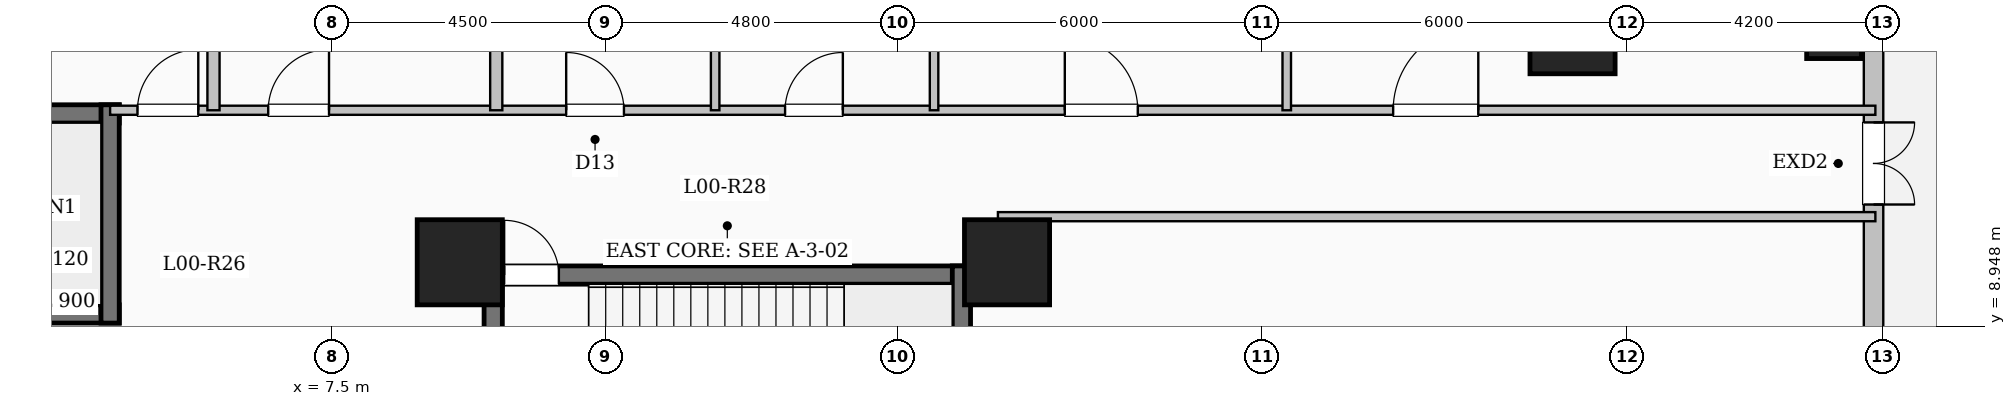
"""IFC4 building model, lengths in metres.
Left out: names, types, materials, properties, quantities, classifications, styles, units other than length and angle.
Written with IfcOpenShell. Run it as: python <this file> out.ifc"""

import sys

from ifc_helpers import new_model, si_unit, direction, frame, frame_2d, origin, origin_2d, place, context, subcontext, project, spatial, rectangle, extrude, element, fill, save


model = new_model("IFC4")
c1 = context("Model", 3, precision=1e-05, world=origin(), true_north=direction((0.0, 1.0)))
c2 = subcontext(c1, "Body", "Model", "MODEL_VIEW")
j1 = project(units=[si_unit("LENGTHUNIT", "METRE"), si_unit("PLANEANGLEUNIT", "RADIAN")], contexts=[c1])
p1 = place(None, origin())
s1 = spatial("IfcSite", under=j1, at=p1, CompositionType="ELEMENT")
p2 = place(p1, origin())
s2 = spatial("IfcBuilding", under=s1, at=p2, CompositionType="ELEMENT")
p3 = place(p2, origin())
s3 = spatial("IfcBuildingStorey", under=s2, at=p3, CompositionType="ELEMENT", Elevation=0.0)
for number, where, z_axis, x_axis in (
    (1, (9.6, 10.0, 0.0), (0.0, 0.0, 1.0), (1.0, 0.0, 0.0)),
    (2, (18.6, 10.0, 0.0), (0.0, 0.0, 1.0), (1.0, 0.0, 0.0)),
):
    element("IfcColumn", number, at=place(p3, frame(where, z_axis=z_axis, x_axis=x_axis)), inside=s3, PredefinedType="COLUMN", context=c2, shape_type="SweptSolid", body=[
        extrude(rectangle(XDim=1.4, YDim=1.4, at=origin_2d()), origin(), (0.0, 0.0, 1.0), 5.4),
    ])
p4 = place(p3, frame((32.2, 13.8, 0.0), z_axis=(0.0, 0.0, 1.0), x_axis=(1.0, 0.0, 0.0)))
e3 = element("IfcColumn", 3, at=p4, inside=s3, PredefinedType="COLUMN", context=c2, shape_type="SweptSolid", body=[
    extrude(rectangle(XDim=0.9, YDim=0.9, at=origin_2d()), origin(), (0.0, 0.0, 1.0), 5.4),
])
p5 = place(p3, frame((27.9, 13.8, 0.0), z_axis=(0.0, 0.0, 1.0), x_axis=(1.0, 0.0, 0.0)))
e4 = element("IfcColumn", 4, at=p5, inside=s3, PredefinedType="COLUMN", context=c2, shape_type="SweptSolid", body=[
    extrude(rectangle(XDim=1.4, YDim=1.4, at=origin_2d()), origin(), (0.0, 0.0, 1.0), 5.4),
])
p6 = place(p3, frame((32.85, 29.85, 0.0), z_axis=(0.0, 0.0, 1.0), x_axis=(0.0, -1.0, 0.0)))
e5 = element("IfcWall", 5, at=p6, inside=s3, PredefinedType="SOLIDWALL", context=c2, shape_type="SweptSolid", body=[
    extrude(rectangle(XDim=59.7, YDim=0.32, at=frame_2d((29.85, 0.0))), origin(), (0.0, 0.0, 1.0), 5.1),
])
p7 = place(p6, frame((17.55, 0.0, 0.0)))
e6 = element("IfcOpeningElement", 6, at=p7, cuts=e5, PredefinedType="OPENING", context=c2, shape_type="SweptSolid", body=[
    extrude(rectangle(XDim=1.35, YDim=2.2, at=frame_2d((0.675, 1.1))), frame((0.0, 0.17, 0.0), z_axis=(0.0, -1.0, 0.0), x_axis=(1.0, 0.0, 0.0)), (0.0, 0.0, 1.0), 0.34),
])
p8 = place(p6, frame((46.65, 0.0, 0.0)))
e7 = element("IfcOpeningElement", 7, at=p8, cuts=e5, PredefinedType="OPENING", context=c2, shape_type="SweptSolid", body=[
    extrude(rectangle(XDim=2.0, YDim=2.4, at=frame_2d((1.0, 1.2))), frame((0.0, 0.17, 0.0), z_axis=(0.0, -1.0, 0.0), x_axis=(1.0, 0.0, 0.0)), (0.0, 0.0, 1.0), 0.34),
])
p9 = place(p6, frame((24.35, 0.0, 0.0)))
e8 = element("IfcOpeningElement", 8, at=p9, cuts=e5, PredefinedType="OPENING", context=c2, shape_type="SweptSolid", body=[
    extrude(rectangle(XDim=3.0, YDim=2.8, at=frame_2d((1.5, 1.4))), frame((0.0, 0.17, 0.0), z_axis=(0.0, -1.0, 0.0), x_axis=(1.0, 0.0, 0.0)), (0.0, 0.0, 1.0), 0.34),
])
p10 = place(p6, frame((7.6, 0.0, 0.9)))
e9 = element("IfcOpeningElement", 9, at=p10, cuts=e5, PredefinedType="OPENING", context=c2, shape_type="SweptSolid", body=[
    extrude(rectangle(XDim=2.1, YDim=2.0, at=frame_2d((1.05, 1.0))), frame((0.0, 0.17, 0.0), z_axis=(0.0, -1.0, 0.0), x_axis=(1.0, 0.0, 0.0)), (0.0, 0.0, 1.0), 0.34),
])
p11 = place(p6, frame((37.758, 0.0, 0.9)))
e10 = element("IfcOpeningElement", 10, at=p11, cuts=e5, PredefinedType="OPENING", context=c2, shape_type="SweptSolid", body=[
    extrude(rectangle(XDim=1.7, YDim=1.9, at=frame_2d((0.85, 0.95))), frame((0.0, 0.17, 0.0), z_axis=(0.0, -1.0, 0.0), x_axis=(1.0, 0.0, 0.0)), (0.0, 0.0, 1.0), 0.34),
])
p12 = place(p6, frame((42.415, 0.0, 0.9)))
e11 = element("IfcOpeningElement", 11, at=p12, cuts=e5, PredefinedType="OPENING", context=c2, shape_type="SweptSolid", body=[
    extrude(rectangle(XDim=2.1, YDim=2.0, at=frame_2d((1.05, 1.0))), frame((0.0, 0.17, 0.0), z_axis=(0.0, -1.0, 0.0), x_axis=(1.0, 0.0, 0.0)), (0.0, 0.0, 1.0), 0.34),
])
p13 = place(p6, frame((55.2, 0.0, 0.9)))
e12 = element("IfcOpeningElement", 12, at=p13, cuts=e5, PredefinedType="OPENING", context=c2, shape_type="SweptSolid", body=[
    extrude(rectangle(XDim=2.1, YDim=2.0, at=frame_2d((1.05, 1.0))), frame((0.0, 0.17, 0.0), z_axis=(0.0, -1.0, 0.0), x_axis=(1.0, 0.0, 0.0)), (0.0, 0.0, 1.0), 0.34),
])
p14 = place(p3, frame((10.0, 9.79, 0.0), z_axis=(0.0, 0.0, 1.0), x_axis=(1.0, 0.0, 0.0)))
e13 = element("IfcWall", 13, at=p14, inside=s3, PredefinedType="SHEAR", context=c2, shape_type="SweptSolid", body=[
    extrude(rectangle(XDim=8.0, YDim=0.3, at=frame_2d((4.0, 0.0))), origin(), (0.0, 0.0, 1.0), 5.4),
])
p15 = place(p14, frame((0.33, 0.0, 0.0)))
e14 = element("IfcOpeningElement", 14, at=p15, cuts=e13, PredefinedType="OPENING", context=c2, shape_type="SweptSolid", body=[
    extrude(rectangle(XDim=0.9, YDim=2.15, at=frame_2d((0.45, 1.075))), frame((0.0, 0.16, 0.0), z_axis=(0.0, -1.0, 0.0), x_axis=(1.0, 0.0, 0.0)), (0.0, 0.0, 1.0), 0.32),
])
for number, where, z_axis, x_axis in (
    (15, (10.15, 6.35, 0.0), (0.0, 0.0, 1.0), (0.0, 1.0, 0.0)),
    (16, (17.85, 6.35, 0.0), (0.0, 0.0, 1.0), (0.0, 1.0, 0.0)),
):
    element("IfcWall", number, at=place(p3, frame(where, z_axis=z_axis, x_axis=x_axis)), inside=s3, PredefinedType="SHEAR", context=c2, shape_type="SweptSolid", body=[
        extrude(rectangle(XDim=3.59, YDim=0.3, at=frame_2d((1.795, 0.0))), origin(), (0.0, 0.0, 1.0), 5.4),
    ])
p16 = place(p3, frame((-4.0, 12.44, 0.0), z_axis=(0.0, 0.0, 1.0), x_axis=(1.0, 0.0, 0.0)))
e17 = element("IfcWall", 17, at=p16, inside=s3, PredefinedType="SHEAR", context=c2, shape_type="SweptSolid", body=[
    extrude(rectangle(XDim=8.0, YDim=0.3, at=frame_2d((4.0, 0.0))), origin(), (0.0, 0.0, 1.0), 5.4),
])
p17 = place(p16, frame((0.55, 0.0, 0.0)))
e18 = element("IfcOpeningElement", 18, at=p17, cuts=e17, PredefinedType="OPENING", context=c2, shape_type="SweptSolid", body=[
    extrude(rectangle(XDim=1.0, YDim=2.15, at=frame_2d((0.5, 1.075))), frame((0.0, 0.16, 0.0), z_axis=(0.0, -1.0, 0.0), x_axis=(1.0, 0.0, 0.0)), (0.0, 0.0, 1.0), 0.32),
])
p18 = place(p3, frame((-4.0, 9.15, 0.0), z_axis=(0.0, 0.0, 1.0), x_axis=(1.0, 0.0, 0.0)))
e19 = element("IfcWall", 19, at=p18, inside=s3, PredefinedType="SHEAR", context=c2, shape_type="SweptSolid", body=[
    extrude(rectangle(XDim=8.0, YDim=0.3, at=frame_2d((4.0, 0.0))), origin(), (0.0, 0.0, 1.0), 5.4),
])
p19 = place(p18, frame((0.55, 0.0, 0.0)))
e20 = element("IfcOpeningElement", 20, at=p19, cuts=e19, PredefinedType="OPENING", context=c2, shape_type="SweptSolid", body=[
    extrude(rectangle(XDim=1.0, YDim=2.15, at=frame_2d((0.5, 1.075))), frame((0.0, 0.16, 0.0), z_axis=(0.0, -1.0, 0.0), x_axis=(1.0, 0.0, 0.0)), (0.0, 0.0, 1.0), 0.32),
])
p20 = place(p3, frame((3.85, 9.0, 0.0), z_axis=(0.0, 0.0, 1.0), x_axis=(0.0, 1.0, 0.0)))
e21 = element("IfcWall", 21, at=p20, inside=s3, PredefinedType="SHEAR", context=c2, shape_type="SweptSolid", body=[
    extrude(rectangle(XDim=3.59, YDim=0.3, at=frame_2d((1.795, 0.0))), origin(), (0.0, 0.0, 1.0), 5.4),
])
p21 = place(p3, frame((3.85, 12.5, 0.0), z_axis=(0.0, 0.0, 1.0), x_axis=(1.0, 0.0, 0.0)))
e22 = element("IfcWall", 22, at=p21, inside=s3, PredefinedType="PARTITIONING", context=c2, shape_type="SweptSolid", body=[
    extrude(rectangle(XDim=29.03, YDim=0.15, at=frame_2d((14.515, 0.0))), origin(), (0.0, 0.0, 1.0), 5.1),
])
p22 = place(p21, frame((0.45, 0.0, 0.0)))
e23 = element("IfcOpeningElement", 23, at=p22, cuts=e22, PredefinedType="OPENING", context=c2, shape_type="SweptSolid", body=[
    extrude(rectangle(XDim=1.0, YDim=2.15, at=frame_2d((0.5, 1.075))), frame((0.0, 0.085, 0.0), z_axis=(0.0, -1.0, 0.0), x_axis=(1.0, 0.0, 0.0)), (0.0, 0.0, 1.0), 0.17),
])
p23 = place(p21, frame((2.6, 0.0, 0.0)))
e24 = element("IfcOpeningElement", 24, at=p23, cuts=e22, PredefinedType="OPENING", context=c2, shape_type="SweptSolid", body=[
    extrude(rectangle(XDim=1.0, YDim=2.15, at=frame_2d((0.5, 1.075))), frame((0.0, 0.085, 0.0), z_axis=(0.0, -1.0, 0.0), x_axis=(1.0, 0.0, 0.0)), (0.0, 0.0, 1.0), 0.17),
])
p24 = place(p21, frame((7.5, 0.0, 0.0)))
e25 = element("IfcOpeningElement", 25, at=p24, cuts=e22, PredefinedType="OPENING", context=c2, shape_type="SweptSolid", body=[
    extrude(rectangle(XDim=0.95, YDim=2.15, at=frame_2d((0.475, 1.075))), frame((0.0, 0.085, 0.0), z_axis=(0.0, -1.0, 0.0), x_axis=(1.0, 0.0, 0.0)), (0.0, 0.0, 1.0), 0.17),
])
p25 = place(p21, frame((11.1, 0.0, 0.0)))
e26 = element("IfcOpeningElement", 26, at=p25, cuts=e22, PredefinedType="OPENING", context=c2, shape_type="SweptSolid", body=[
    extrude(rectangle(XDim=0.95, YDim=2.15, at=frame_2d((0.475, 1.075))), frame((0.0, 0.085, 0.0), z_axis=(0.0, -1.0, 0.0), x_axis=(1.0, 0.0, 0.0)), (0.0, 0.0, 1.0), 0.17),
])
p26 = place(p21, frame((15.7, 0.0, 0.0)))
e27 = element("IfcOpeningElement", 27, at=p26, cuts=e22, PredefinedType="OPENING", context=c2, shape_type="SweptSolid", body=[
    extrude(rectangle(XDim=1.2, YDim=2.15, at=frame_2d((0.6, 1.075))), frame((0.0, 0.085, 0.0), z_axis=(0.0, -1.0, 0.0), x_axis=(1.0, 0.0, 0.0)), (0.0, 0.0, 1.0), 0.17),
])
p27 = place(p21, frame((21.1, 0.0, 0.0)))
e28 = element("IfcOpeningElement", 28, at=p27, cuts=e22, PredefinedType="OPENING", context=c2, shape_type="SweptSolid", body=[
    extrude(rectangle(XDim=1.4, YDim=2.2, at=frame_2d((0.7, 1.1))), frame((0.0, 0.085, 0.0), z_axis=(0.0, -1.0, 0.0), x_axis=(1.0, 0.0, 0.0)), (0.0, 0.0, 1.0), 0.17),
])
p28 = place(p3, frame((5.55, 12.5, 0.0), z_axis=(0.0, 0.0, 1.0), x_axis=(0.0, 1.0, 0.0)))
e29 = element("IfcWall", 29, at=p28, inside=s3, PredefinedType="SOLIDWALL", context=c2, shape_type="SweptSolid", body=[
    extrude(rectangle(XDim=17.38, YDim=0.2, at=frame_2d((8.69, 0.0))), origin(), (0.0, 0.0, 1.0), 4.285),
])
p29 = place(p3, frame((10.2, 12.5, 0.0), z_axis=(0.0, 0.0, 1.0), x_axis=(0.0, 1.0, 0.0)))
e30 = element("IfcWall", 30, at=p29, inside=s3, PredefinedType="SOLIDWALL", context=c2, shape_type="SweptSolid", body=[
    extrude(rectangle(XDim=17.38, YDim=0.2, at=frame_2d((8.69, 0.0))), origin(), (0.0, 0.0, 1.0), 5.1),
])
p30 = place(p3, frame((13.8, 12.5, 0.0), z_axis=(0.0, 0.0, 1.0), x_axis=(0.0, 1.0, 0.0)))
e31 = element("IfcWall", 31, at=p30, inside=s3, PredefinedType="PARTITIONING", context=c2, shape_type="SweptSolid", body=[
    extrude(rectangle(XDim=17.38, YDim=0.14, at=frame_2d((8.69, 0.0))), origin(), (0.0, 0.0, 1.0), 5.1),
])
p31 = place(p3, frame((17.4, 12.5, 0.0), z_axis=(0.0, 0.0, 1.0), x_axis=(0.0, 1.0, 0.0)))
e32 = element("IfcWall", 32, at=p31, inside=s3, PredefinedType="PARTITIONING", context=c2, shape_type="SweptSolid", body=[
    extrude(rectangle(XDim=17.38, YDim=0.14, at=frame_2d((8.69, 0.0))), origin(), (0.0, 0.0, 1.0), 4.285),
])
p32 = place(p3, frame((23.2, 12.5, 0.0), z_axis=(0.0, 0.0, 1.0), x_axis=(0.0, 1.0, 0.0)))
e33 = element("IfcWall", 33, at=p32, inside=s3, PredefinedType="PARTITIONING", context=c2, shape_type="SweptSolid", body=[
    extrude(rectangle(XDim=17.38, YDim=0.14, at=frame_2d((8.69, 0.0))), origin(), (0.0, 0.0, 1.0), 5.1),
])
p33 = place(p3, frame((18.45, 10.75, 0.0), z_axis=(0.0, 0.0, 1.0), x_axis=(1.0, 0.0, 0.0)))
e34 = element("IfcWall", 34, at=p33, inside=s3, PredefinedType="PARTITIONING", context=c2, shape_type="SweptSolid", body=[
    extrude(rectangle(XDim=14.43, YDim=0.15, at=frame_2d((7.215, 0.0))), origin(), (0.0, 0.0, 1.0), 5.1),
])
p34 = place(p7, origin())
e35 = element("IfcDoor", 35, at=p34, inside=s3, OperationType="DOUBLE_DOOR_SINGLE_SWING", PredefinedType="DOOR", context=c2, shape_type="SweptSolid", body=[
    extrude(rectangle(XDim=1.35, YDim=2.2, at=frame_2d((0.675, 1.1))), frame((0.0, 0.025, 0.0), z_axis=(0.0, -1.0, 0.0), x_axis=(1.0, 0.0, 0.0)), (0.0, 0.0, 1.0), 0.05),
])
fill(e6, e35)
p35 = place(p15, origin())
e36 = element("IfcDoor", 36, at=p35, inside=s3, OperationType="SINGLE_SWING_LEFT", PredefinedType="DOOR", context=c2, shape_type="SweptSolid", body=[
    extrude(rectangle(XDim=0.9, YDim=2.15, at=frame_2d((0.45, 1.075))), frame((0.0, 0.025, 0.0), z_axis=(0.0, -1.0, 0.0), x_axis=(1.0, 0.0, 0.0)), (0.0, 0.0, 1.0), 0.05),
])
fill(e14, e36)
p36 = place(p22, origin())
e37 = element("IfcDoor", 37, at=p36, inside=s3, OperationType="SINGLE_SWING_RIGHT", PredefinedType="DOOR", context=c2, shape_type="SweptSolid", body=[
    extrude(rectangle(XDim=1.0, YDim=2.15, at=frame_2d((0.5, 1.075))), frame((0.0, 0.025, 0.0), z_axis=(0.0, -1.0, 0.0), x_axis=(1.0, 0.0, 0.0)), (0.0, 0.0, 1.0), 0.05),
])
fill(e23, e37)
p37 = place(p23, origin())
e38 = element("IfcDoor", 38, at=p37, inside=s3, OperationType="SINGLE_SWING_RIGHT", PredefinedType="DOOR", context=c2, shape_type="SweptSolid", body=[
    extrude(rectangle(XDim=1.0, YDim=2.15, at=frame_2d((0.5, 1.075))), frame((0.0, 0.025, 0.0), z_axis=(0.0, -1.0, 0.0), x_axis=(1.0, 0.0, 0.0)), (0.0, 0.0, 1.0), 0.05),
])
fill(e24, e38)
p38 = place(p24, origin())
e39 = element("IfcDoor", 39, at=p38, inside=s3, OperationType="SINGLE_SWING_LEFT", PredefinedType="DOOR", context=c2, shape_type="SweptSolid", body=[
    extrude(rectangle(XDim=0.95, YDim=2.15, at=frame_2d((0.475, 1.075))), frame((0.0, 0.025, 0.0), z_axis=(0.0, -1.0, 0.0), x_axis=(1.0, 0.0, 0.0)), (0.0, 0.0, 1.0), 0.05),
])
fill(e25, e39)
p39 = place(p25, origin())
e40 = element("IfcDoor", 40, at=p39, inside=s3, OperationType="SINGLE_SWING_RIGHT", PredefinedType="DOOR", context=c2, shape_type="SweptSolid", body=[
    extrude(rectangle(XDim=0.95, YDim=2.15, at=frame_2d((0.475, 1.075))), frame((0.0, 0.025, 0.0), z_axis=(0.0, -1.0, 0.0), x_axis=(1.0, 0.0, 0.0)), (0.0, 0.0, 1.0), 0.05),
])
fill(e26, e40)
p40 = place(p26, origin())
e41 = element("IfcDoor", 41, at=p40, inside=s3, OperationType="SINGLE_SWING_LEFT", PredefinedType="DOOR", context=c2, shape_type="SweptSolid", body=[
    extrude(rectangle(XDim=1.2, YDim=2.15, at=frame_2d((0.6, 1.075))), frame((0.0, 0.025, 0.0), z_axis=(0.0, -1.0, 0.0), x_axis=(1.0, 0.0, 0.0)), (0.0, 0.0, 1.0), 0.05),
])
fill(e27, e41)
p41 = place(p27, origin())
e42 = element("IfcDoor", 42, at=p41, inside=s3, OperationType="SINGLE_SWING_RIGHT", PredefinedType="DOOR", context=c2, shape_type="SweptSolid", body=[
    extrude(rectangle(XDim=1.4, YDim=2.2, at=frame_2d((0.7, 1.1))), frame((0.0, 0.025, 0.0), z_axis=(0.0, -1.0, 0.0), x_axis=(1.0, 0.0, 0.0)), (0.0, 0.0, 1.0), 0.05),
])
fill(e28, e42)
save(model, sys.argv[1])
